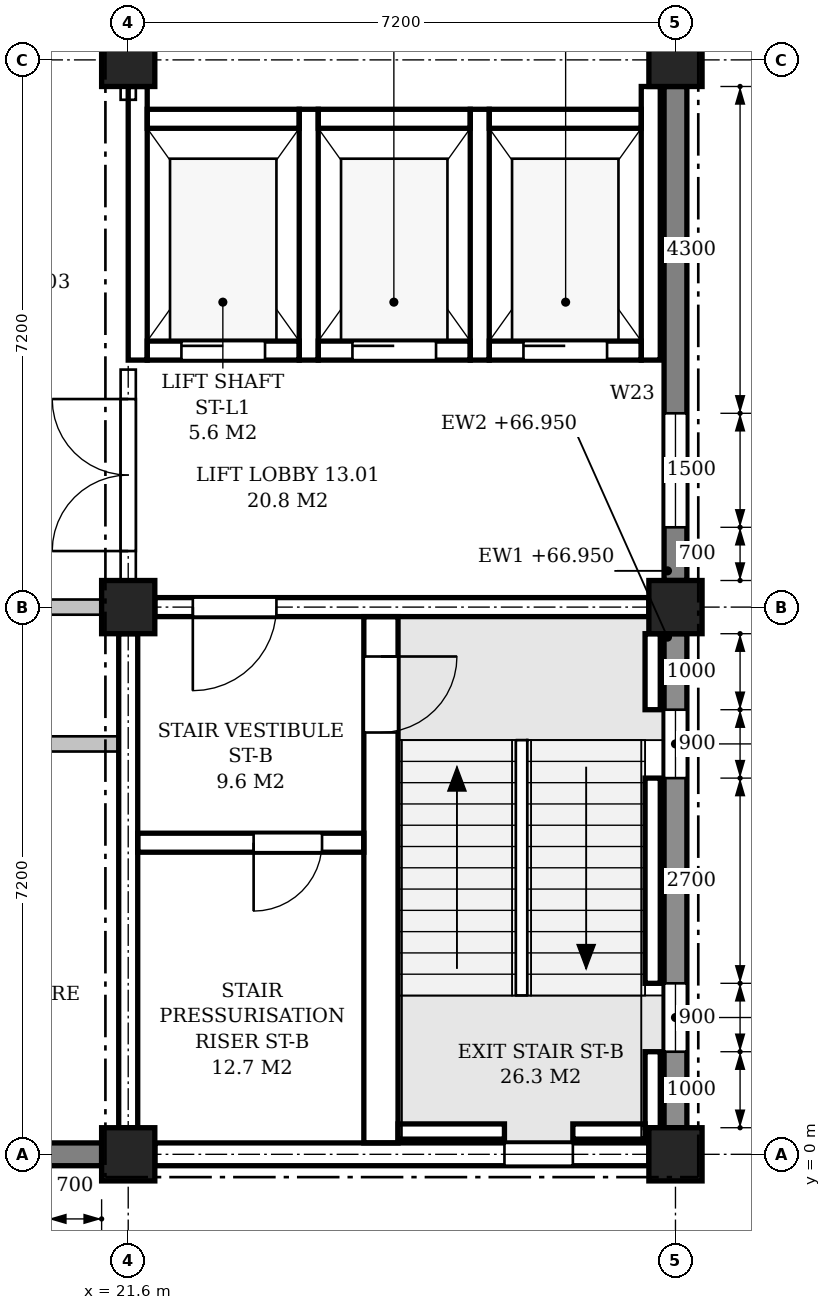
"""IFC4 building model, lengths in metres.
Left out: names, types, materials, properties, quantities, classifications, styles, units other than length and angle.
Written with IfcOpenShell. Run it as: python <this file> out.ifc"""

import sys

from ifc_helpers import new_model, si_unit, direction, frame, frame_2d, origin, origin_2d, place, context, subcontext, project, spatial, polyline, rectangle, outline, extrude, element, fill, save


model = new_model("IFC4")
c1 = context("Model", 3, precision=1e-05, world=origin(), true_north=direction((0.0, 1.0)))
c2 = subcontext(c1, "Body", "Model", "MODEL_VIEW")
j1 = project(units=[si_unit("LENGTHUNIT", "METRE"), si_unit("PLANEANGLEUNIT", "RADIAN")], contexts=[c1])
p1 = place(None, origin())
s1 = spatial("IfcSite", under=j1, at=p1, CompositionType="ELEMENT")
p2 = place(p1, origin())
s2 = spatial("IfcBuilding", under=s1, at=p2, CompositionType="ELEMENT")
p3 = place(p2, frame((0.0, 0.0, 63.3)))
s3 = spatial("IfcBuildingStorey", under=s2, at=p3, CompositionType="ELEMENT", Elevation=63.3)
for number, where, z_axis, x_axis in (
    (1, (21.6, 0.0, 0.0), (0.0, 0.0, 1.0), (1.0, 0.0, 0.0)),
    (2, (21.6, 7.2, 0.0), (0.0, 0.0, 1.0), (1.0, 0.0, 0.0)),
    (3, (21.6, 14.4, 0.0), (0.0, 0.0, 1.0), (1.0, 0.0, 0.0)),
    (4, (28.8, 0.0, 0.0), (0.0, 0.0, 1.0), (1.0, 0.0, 0.0)),
    (5, (28.8, 7.2, 0.0), (0.0, 0.0, 1.0), (1.0, 0.0, 0.0)),
    (6, (28.8, 14.4, 0.0), (0.0, 0.0, 1.0), (1.0, 0.0, 0.0)),
):
    element("IfcColumn", number, at=place(p3, frame(where, z_axis=z_axis, x_axis=x_axis)), inside=s3, PredefinedType="COLUMN", context=c2, shape_type="SweptSolid", body=[
        extrude(rectangle(XDim=0.7, YDim=0.7, at=origin_2d()), origin(), (0.0, 0.0, 1.0), 4.5),
    ])
p4 = place(p3, frame((14.75, 0.0, 0.0), z_axis=(0.0, 0.0, 1.0), x_axis=(1.0, 0.0, 0.0)))
e7 = element("IfcWall", 7, at=p4, inside=s3, PredefinedType="STANDARD", context=c2, shape_type="SweptSolid", body=[
    extrude(rectangle(XDim=6.5, YDim=0.3, at=frame_2d((3.25, 0.0))), origin(), (0.0, 0.0, 1.0), 3.65),
])
p5 = place(p4, frame((0.7, 0.0, 0.9)))
e8 = element("IfcOpeningElement", 8, at=p5, cuts=e7, PredefinedType="OPENING", context=c2, shape_type="SweptSolid", body=[
    extrude(outline(polyline([(0.0, 0.0), (1.5, 0.0), (1.5, 1.95), (0.75, 2.7), (0.0, 1.95), (0.0, 0.0)])), frame((0.0, 0.16, 0.0), z_axis=(0.0, -1.0, 0.0), x_axis=(1.0, 0.0, 0.0)), (0.0, 0.0, 1.0), 0.32),
])
p6 = place(p4, frame((4.3, 0.0, 0.9)))
e9 = element("IfcOpeningElement", 9, at=p6, cuts=e7, PredefinedType="OPENING", context=c2, shape_type="SweptSolid", body=[
    extrude(outline(polyline([(0.0, 0.0), (1.5, 0.0), (1.5, 1.95), (0.75, 2.7), (0.0, 1.95), (0.0, 0.0)])), frame((0.0, 0.16, 0.0), z_axis=(0.0, -1.0, 0.0), x_axis=(1.0, 0.0, 0.0)), (0.0, 0.0, 1.0), 0.32),
])
p7 = place(p3, frame((21.95, 0.0, 0.0), z_axis=(0.0, 0.0, 1.0), x_axis=(1.0, 0.0, 0.0)))
e10 = element("IfcWall", 10, at=p7, inside=s3, PredefinedType="STANDARD", context=c2, shape_type="SweptSolid", body=[
    extrude(rectangle(XDim=6.5, YDim=0.3, at=frame_2d((3.25, 0.0))), origin(), (0.0, 0.0, 1.0), 3.65),
])
p8 = place(p7, frame((4.6, 0.0, 0.9)))
e11 = element("IfcOpeningElement", 11, at=p8, cuts=e10, PredefinedType="OPENING", context=c2, shape_type="SweptSolid", body=[
    extrude(outline(polyline([(0.0, 0.0), (0.9, 0.0), (0.9, 2.25), (0.45, 2.7), (0.0, 2.25), (0.0, 0.0)])), frame((0.0, 0.16, 0.0), z_axis=(0.0, -1.0, 0.0), x_axis=(1.0, 0.0, 0.0)), (0.0, 0.0, 1.0), 0.32),
])
p9 = place(p3, frame((28.8, 0.35, 0.0), z_axis=(0.0, 0.0, 1.0), x_axis=(0.0, 1.0, 0.0)))
e12 = element("IfcWall", 12, at=p9, inside=s3, PredefinedType="STANDARD", context=c2, shape_type="SweptSolid", body=[
    extrude(rectangle(XDim=6.5, YDim=0.3, at=frame_2d((3.25, 0.0))), origin(), (0.0, 0.0, 1.0), 3.65),
])
p10 = place(p9, frame((1.0, 0.0, 0.9)))
e13 = element("IfcOpeningElement", 13, at=p10, cuts=e12, PredefinedType="OPENING", context=c2, shape_type="SweptSolid", body=[
    extrude(outline(polyline([(0.0, 0.0), (0.9, 0.0), (0.9, 2.25), (0.45, 2.7), (0.0, 2.25), (0.0, 0.0)])), frame((0.0, 0.16, 0.0), z_axis=(0.0, -1.0, 0.0), x_axis=(1.0, 0.0, 0.0)), (0.0, 0.0, 1.0), 0.32),
])
p11 = place(p9, frame((4.6, 0.0, 0.9)))
e14 = element("IfcOpeningElement", 14, at=p11, cuts=e12, PredefinedType="OPENING", context=c2, shape_type="SweptSolid", body=[
    extrude(outline(polyline([(0.0, 0.0), (0.9, 0.0), (0.9, 2.25), (0.45, 2.7), (0.0, 2.25), (0.0, 0.0)])), frame((0.0, 0.16, 0.0), z_axis=(0.0, -1.0, 0.0), x_axis=(1.0, 0.0, 0.0)), (0.0, 0.0, 1.0), 0.32),
])
p12 = place(p3, frame((28.8, 7.55, 0.0), z_axis=(0.0, 0.0, 1.0), x_axis=(0.0, 1.0, 0.0)))
e15 = element("IfcWall", 15, at=p12, inside=s3, PredefinedType="STANDARD", context=c2, shape_type="SweptSolid", body=[
    extrude(rectangle(XDim=6.5, YDim=0.3, at=frame_2d((3.25, 0.0))), origin(), (0.0, 0.0, 1.0), 3.65),
])
p13 = place(p12, frame((0.7, 0.0, 0.9)))
e16 = element("IfcOpeningElement", 16, at=p13, cuts=e15, PredefinedType="OPENING", context=c2, shape_type="SweptSolid", body=[
    extrude(outline(polyline([(0.0, 0.0), (1.5, 0.0), (1.5, 1.95), (0.75, 2.7), (0.0, 1.95), (0.0, 0.0)])), frame((0.0, 0.16, 0.0), z_axis=(0.0, -1.0, 0.0), x_axis=(1.0, 0.0, 0.0)), (0.0, 0.0, 1.0), 0.32),
])
p14 = place(p3, frame((21.95, 7.2, 0.0), z_axis=(0.0, 0.0, 1.0), x_axis=(1.0, 0.0, 0.0)))
e17 = element("IfcWall", 17, at=p14, inside=s3, PredefinedType="SHEAR", context=c2, shape_type="SweptSolid", body=[
    extrude(rectangle(XDim=6.5, YDim=0.25, at=frame_2d((3.25, 0.0))), origin(), (0.0, 0.0, 1.0), 3.6),
])
p15 = place(p14, frame((0.5, 0.0, 0.0)))
e18 = element("IfcOpeningElement", 18, at=p15, cuts=e17, PredefinedType="OPENING", context=c2, shape_type="SweptSolid", body=[
    extrude(rectangle(XDim=1.1, YDim=2.1, at=frame_2d((0.55, 1.05))), frame((0.0, 0.135, 0.0), z_axis=(0.0, -1.0, 0.0), x_axis=(1.0, 0.0, 0.0)), (0.0, 0.0, 1.0), 0.27),
])
p16 = place(p3, frame((21.6, 0.35, 0.0), z_axis=(0.0, 0.0, 1.0), x_axis=(0.0, 1.0, 0.0)))
e19 = element("IfcWall", 19, at=p16, inside=s3, PredefinedType="SHEAR", context=c2, shape_type="SweptSolid", body=[
    extrude(rectangle(XDim=6.5, YDim=0.25, at=frame_2d((3.25, 0.0))), origin(), (0.0, 0.0, 1.0), 3.6),
])
p17 = place(p3, frame((28.5, 0.35, -0.25), z_axis=(0.0, 0.0, 1.0), x_axis=(0.0, 1.0, 0.0)))
e20 = element("IfcWall", 20, at=p17, inside=s3, PredefinedType="SHEAR", context=c2, shape_type="SweptSolid", body=[
    extrude(rectangle(XDim=1.0, YDim=0.2, at=frame_2d((0.5, 0.0))), origin(), (0.0, 0.0, 1.0), 4.5),
])
p18 = place(p3, frame((28.5, 2.25, -0.25), z_axis=(0.0, 0.0, 1.0), x_axis=(0.0, 1.0, 0.0)))
e21 = element("IfcWall", 21, at=p18, inside=s3, PredefinedType="SHEAR", context=c2, shape_type="SweptSolid", body=[
    extrude(rectangle(XDim=2.7, YDim=0.2, at=frame_2d((1.35, 0.0))), origin(), (0.0, 0.0, 1.0), 4.5),
])
p19 = place(p3, frame((28.5, 5.85, -0.25), z_axis=(0.0, 0.0, 1.0), x_axis=(0.0, 1.0, 0.0)))
e22 = element("IfcWall", 22, at=p19, inside=s3, PredefinedType="SHEAR", context=c2, shape_type="SweptSolid", body=[
    extrude(rectangle(XDim=1.0, YDim=0.2, at=frame_2d((0.5, 0.0))), origin(), (0.0, 0.0, 1.0), 4.5),
])
p20 = place(p3, frame((25.15, 0.3, -0.25), z_axis=(0.0, 0.0, 1.0), x_axis=(1.0, 0.0, 0.0)))
e23 = element("IfcWall", 23, at=p20, inside=s3, PredefinedType="SHEAR", context=c2, shape_type="SweptSolid", body=[
    extrude(rectangle(XDim=1.4, YDim=0.2, at=frame_2d((0.7, 0.0))), origin(), (0.0, 0.0, 1.0), 4.5),
])
p21 = place(p3, frame((27.45, 0.3, -0.25), z_axis=(0.0, 0.0, 1.0), x_axis=(1.0, 0.0, 0.0)))
e24 = element("IfcWall", 24, at=p21, inside=s3, PredefinedType="SHEAR", context=c2, shape_type="SweptSolid", body=[
    extrude(rectangle(XDim=0.95, YDim=0.2, at=frame_2d((0.475, 0.0))), origin(), (0.0, 0.0, 1.0), 4.5),
])
p22 = place(p3, frame((24.925, 0.15, 0.0), z_axis=(0.0, 0.0, 1.0), x_axis=(0.0, 1.0, 0.0)))
e25 = element("IfcWall", 25, at=p22, inside=s3, PredefinedType="SHEAR", context=c2, shape_type="SweptSolid", body=[
    extrude(rectangle(XDim=6.925, YDim=0.45, at=frame_2d((3.462, 0.0))), origin(), (0.0, 0.0, 1.0), 4.25),
])
p23 = place(p22, frame((5.4, 0.0, 0.0)))
e26 = element("IfcOpeningElement", 26, at=p23, cuts=e25, PredefinedType="OPENING", context=c2, shape_type="SweptSolid", body=[
    extrude(rectangle(XDim=1.0, YDim=2.1, at=frame_2d((0.5, 1.05))), frame((0.0, 0.235, 0.0), z_axis=(0.0, -1.0, 0.0), x_axis=(1.0, 0.0, 0.0)), (0.0, 0.0, 1.0), 0.47),
])
p24 = place(p3, frame((21.725, 4.1, 0.0), z_axis=(0.0, 0.0, 1.0), x_axis=(1.0, 0.0, 0.0)))
e27 = element("IfcWall", 27, at=p24, inside=s3, PredefinedType="SHEAR", context=c2, shape_type="SweptSolid", body=[
    extrude(rectangle(XDim=2.975, YDim=0.25, at=frame_2d((1.487, 0.0))), origin(), (0.0, 0.0, 1.0), 4.25),
])
p25 = place(p24, frame((1.525, 0.0, 0.0)))
e28 = element("IfcOpeningElement", 28, at=p25, cuts=e27, PredefinedType="OPENING", context=c2, shape_type="SweptSolid", body=[
    extrude(rectangle(XDim=0.9, YDim=2.1, at=frame_2d((0.45, 1.05))), frame((0.0, 0.135, 0.0), z_axis=(0.0, -1.0, 0.0), x_axis=(1.0, 0.0, 0.0)), (0.0, 0.0, 1.0), 0.27),
])
p26 = place(p3, frame((21.725, 10.45, -0.25), z_axis=(0.0, 0.0, 1.0), x_axis=(0.0, 1.0, 0.0)))
e29 = element("IfcWall", 29, at=p26, inside=s3, PredefinedType="SHEAR", context=c2, shape_type="SweptSolid", body=[
    extrude(rectangle(XDim=3.6, YDim=0.25, at=frame_2d((1.8, 0.0))), origin(), (0.0, 0.0, 1.0), 3.85),
])
for number, where, z_axis, x_axis in (
    (30, (23.975, 10.45, -0.25), (0.0, 0.0, 1.0), (0.0, 1.0, 0.0)),
    (31, (26.225, 10.45, -0.25), (0.0, 0.0, 1.0), (0.0, 1.0, 0.0)),
):
    element("IfcWall", number, at=place(p3, frame(where, z_axis=z_axis, x_axis=x_axis)), inside=s3, PredefinedType="SHEAR", context=c2, shape_type="SweptSolid", body=[
        extrude(rectangle(XDim=3.3, YDim=0.25, at=frame_2d((1.65, 0.0))), origin(), (0.0, 0.0, 1.0), 4.5),
    ])
p27 = place(p3, frame((28.475, 10.45, -0.25), z_axis=(0.0, 0.0, 1.0), x_axis=(0.0, 1.0, 0.0)))
e32 = element("IfcWall", 32, at=p27, inside=s3, PredefinedType="SHEAR", context=c2, shape_type="SweptSolid", body=[
    extrude(rectangle(XDim=3.6, YDim=0.25, at=frame_2d((1.8, 0.0))), origin(), (0.0, 0.0, 1.0), 4.5),
])
p28 = place(p3, frame((21.85, 10.575, -0.25), z_axis=(0.0, 0.0, 1.0), x_axis=(1.0, 0.0, 0.0)))
e33 = element("IfcWall", 33, at=p28, inside=s3, PredefinedType="SHEAR", context=c2, shape_type="SweptSolid", body=[
    extrude(rectangle(XDim=2.0, YDim=0.25, at=frame_2d((1.0, 0.0))), origin(), (0.0, 0.0, 1.0), 4.5),
])
p29 = place(p28, frame((0.45, 0.0, 0.25)))
e34 = element("IfcOpeningElement", 34, at=p29, cuts=e33, PredefinedType="OPENING", context=c2, shape_type="SweptSolid", body=[
    extrude(rectangle(XDim=1.1, YDim=2.1, at=frame_2d((0.55, 1.05))), frame((0.0, 0.135, 0.0), z_axis=(0.0, -1.0, 0.0), x_axis=(1.0, 0.0, 0.0)), (0.0, 0.0, 1.0), 0.27),
])
p30 = place(p3, frame((21.85, 13.625, -0.25), z_axis=(0.0, 0.0, 1.0), x_axis=(1.0, 0.0, 0.0)))
e35 = element("IfcWall", 35, at=p30, inside=s3, PredefinedType="SHEAR", context=c2, shape_type="SweptSolid", body=[
    extrude(rectangle(XDim=2.0, YDim=0.25, at=frame_2d((1.0, 0.0))), origin(), (0.0, 0.0, 1.0), 4.5),
])
p31 = place(p3, frame((24.1, 10.575, -0.25), z_axis=(0.0, 0.0, 1.0), x_axis=(1.0, 0.0, 0.0)))
e36 = element("IfcWall", 36, at=p31, inside=s3, PredefinedType="SHEAR", context=c2, shape_type="SweptSolid", body=[
    extrude(rectangle(XDim=2.0, YDim=0.25, at=frame_2d((1.0, 0.0))), origin(), (0.0, 0.0, 1.0), 4.5),
])
p32 = place(p31, frame((0.45, 0.0, 0.25)))
e37 = element("IfcOpeningElement", 37, at=p32, cuts=e36, PredefinedType="OPENING", context=c2, shape_type="SweptSolid", body=[
    extrude(rectangle(XDim=1.1, YDim=2.1, at=frame_2d((0.55, 1.05))), frame((0.0, 0.135, 0.0), z_axis=(0.0, -1.0, 0.0), x_axis=(1.0, 0.0, 0.0)), (0.0, 0.0, 1.0), 0.27),
])
p33 = place(p3, frame((24.1, 13.625, -0.25), z_axis=(0.0, 0.0, 1.0), x_axis=(1.0, 0.0, 0.0)))
e38 = element("IfcWall", 38, at=p33, inside=s3, PredefinedType="SHEAR", context=c2, shape_type="SweptSolid", body=[
    extrude(rectangle(XDim=2.0, YDim=0.25, at=frame_2d((1.0, 0.0))), origin(), (0.0, 0.0, 1.0), 4.5),
])
p34 = place(p3, frame((26.35, 10.575, -0.25), z_axis=(0.0, 0.0, 1.0), x_axis=(1.0, 0.0, 0.0)))
e39 = element("IfcWall", 39, at=p34, inside=s3, PredefinedType="SHEAR", context=c2, shape_type="SweptSolid", body=[
    extrude(rectangle(XDim=2.0, YDim=0.25, at=frame_2d((1.0, 0.0))), origin(), (0.0, 0.0, 1.0), 4.5),
])
p35 = place(p34, frame((0.45, 0.0, 0.25)))
e40 = element("IfcOpeningElement", 40, at=p35, cuts=e39, PredefinedType="OPENING", context=c2, shape_type="SweptSolid", body=[
    extrude(rectangle(XDim=1.1, YDim=2.1, at=frame_2d((0.55, 1.05))), frame((0.0, 0.135, 0.0), z_axis=(0.0, -1.0, 0.0), x_axis=(1.0, 0.0, 0.0)), (0.0, 0.0, 1.0), 0.27),
])
p36 = place(p3, frame((26.35, 13.625, -0.25), z_axis=(0.0, 0.0, 1.0), x_axis=(1.0, 0.0, 0.0)))
e41 = element("IfcWall", 41, at=p36, inside=s3, PredefinedType="SHEAR", context=c2, shape_type="SweptSolid", body=[
    extrude(rectangle(XDim=2.0, YDim=0.25, at=frame_2d((1.0, 0.0))), origin(), (0.0, 0.0, 1.0), 4.5),
])
p37 = place(p3, frame((7.325, 5.4, 0.0), z_axis=(0.0, 0.0, 1.0), x_axis=(1.0, 0.0, 0.0)))
e42 = element("IfcWall", 42, at=p37, inside=s3, PredefinedType="PARTITIONING", context=c2, shape_type="SweptSolid", body=[
    extrude(outline(polyline([(0.0, 0.0), (14.15, 0.0), (14.15, 3.6), (14.075, 3.6), (14.075, 4.25), (7.275, 4.25), (7.275, 3.6), (6.875, 3.6), (6.875, 4.25), (0.075, 4.25), (0.075, 3.6), (0.0, 3.6), (0.0, 0.0)])), frame((0.0, 0.1, 0.0), z_axis=(0.0, -1.0, 0.0), x_axis=(1.0, 0.0, 0.0)), (0.0, 0.0, 1.0), 0.2),
])
p38 = place(p37, frame((1.238, 0.0, 0.0)))
e43 = element("IfcOpeningElement", 43, at=p38, cuts=e42, PredefinedType="OPENING", context=c2, shape_type="SweptSolid", body=[
    extrude(rectangle(XDim=1.0, YDim=2.1, at=frame_2d((0.5, 1.05))), frame((0.0, 0.11, 0.0), z_axis=(0.0, -1.0, 0.0), x_axis=(1.0, 0.0, 0.0)), (0.0, 0.0, 1.0), 0.22),
])
p39 = place(p37, frame((4.775, 0.0, 0.0)))
e44 = element("IfcOpeningElement", 44, at=p39, cuts=e42, PredefinedType="OPENING", context=c2, shape_type="SweptSolid", body=[
    extrude(rectangle(XDim=1.0, YDim=2.1, at=frame_2d((0.5, 1.05))), frame((0.0, 0.11, 0.0), z_axis=(0.0, -1.0, 0.0), x_axis=(1.0, 0.0, 0.0)), (0.0, 0.0, 1.0), 0.22),
])
p40 = place(p37, frame((8.375, 0.0, 0.0)))
e45 = element("IfcOpeningElement", 45, at=p40, cuts=e42, PredefinedType="OPENING", context=c2, shape_type="SweptSolid", body=[
    extrude(rectangle(XDim=1.0, YDim=2.1, at=frame_2d((0.5, 1.05))), frame((0.0, 0.11, 0.0), z_axis=(0.0, -1.0, 0.0), x_axis=(1.0, 0.0, 0.0)), (0.0, 0.0, 1.0), 0.22),
])
p41 = place(p37, frame((11.913, 0.0, 0.0)))
e46 = element("IfcOpeningElement", 46, at=p41, cuts=e42, PredefinedType="OPENING", context=c2, shape_type="SweptSolid", body=[
    extrude(rectangle(XDim=1.0, YDim=2.1, at=frame_2d((0.5, 1.05))), frame((0.0, 0.11, 0.0), z_axis=(0.0, -1.0, 0.0), x_axis=(1.0, 0.0, 0.0)), (0.0, 0.0, 1.0), 0.22),
])
p42 = place(p3, frame((14.75, 7.2, 0.0), z_axis=(0.0, 0.0, 1.0), x_axis=(1.0, 0.0, 0.0)))
e47 = element("IfcWall", 47, at=p42, inside=s3, PredefinedType="PARTITIONING", context=c2, shape_type="SweptSolid", body=[
    extrude(rectangle(XDim=6.5, YDim=0.2, at=frame_2d((3.25, 0.0))), origin(), (0.0, 0.0, 1.0), 3.6),
])
p43 = place(p42, frame((4.375, 0.0, 0.0)))
e48 = element("IfcOpeningElement", 48, at=p43, cuts=e47, PredefinedType="OPENING", context=c2, shape_type="SweptSolid", body=[
    extrude(rectangle(XDim=1.0, YDim=2.1, at=frame_2d((0.5, 1.05))), frame((0.0, 0.11, 0.0), z_axis=(0.0, -1.0, 0.0), x_axis=(1.0, 0.0, 0.0)), (0.0, 0.0, 1.0), 0.22),
])
p44 = place(p3, frame((21.6, 7.55, 0.0), z_axis=(0.0, 0.0, 1.0), x_axis=(0.0, 1.0, 0.0)))
e49 = element("IfcWall", 49, at=p44, inside=s3, PredefinedType="PARTITIONING", context=c2, shape_type="SweptSolid", body=[
    extrude(rectangle(XDim=2.775, YDim=0.2, at=frame_2d((1.387, 0.0))), origin(), (0.0, 0.0, 1.0), 3.6),
])
p45 = place(p44, frame((0.387, 0.0, 0.0)))
e50 = element("IfcOpeningElement", 50, at=p45, cuts=e49, PredefinedType="OPENING", context=c2, shape_type="SweptSolid", body=[
    extrude(rectangle(XDim=2.0, YDim=2.4, at=frame_2d((1.0, 1.2))), frame((0.0, 0.11, 0.0), z_axis=(0.0, -1.0, 0.0), x_axis=(1.0, 0.0, 0.0)), (0.0, 0.0, 1.0), 0.22),
])
p46 = place(p3, frame((21.6, 13.875, 0.0), z_axis=(0.0, 0.0, 1.0), x_axis=(0.0, 1.0, 0.0)))
e51 = element("IfcWall", 51, at=p46, inside=s3, PredefinedType="PARTITIONING", context=c2, shape_type="SweptSolid", body=[
    extrude(rectangle(XDim=0.175, YDim=0.2, at=frame_2d((0.087, 0.0))), origin(), (0.0, 0.0, 1.0), 3.6),
])
p47 = place(p10, origin())
e52 = element("IfcWindow", 52, at=p47, inside=s3, PartitioningType="SINGLE_PANEL", PredefinedType="WINDOW", context=c2, shape_type="SweptSolid", body=[
    extrude(outline(polyline([(0.0, 0.0), (0.9, 0.0), (0.9, 2.25), (0.45, 2.7), (0.0, 2.25), (0.0, 0.0)])), frame((0.0, 0.03, 0.0), z_axis=(0.0, -1.0, 0.0), x_axis=(1.0, 0.0, 0.0)), (0.0, 0.0, 1.0), 0.06),
])
fill(e13, e52)
p48 = place(p11, origin())
e53 = element("IfcWindow", 53, at=p48, inside=s3, PartitioningType="SINGLE_PANEL", PredefinedType="WINDOW", context=c2, shape_type="SweptSolid", body=[
    extrude(outline(polyline([(0.0, 0.0), (0.9, 0.0), (0.9, 2.25), (0.45, 2.7), (0.0, 2.25), (0.0, 0.0)])), frame((0.0, 0.03, 0.0), z_axis=(0.0, -1.0, 0.0), x_axis=(1.0, 0.0, 0.0)), (0.0, 0.0, 1.0), 0.06),
])
fill(e14, e53)
p49 = place(p13, origin())
e54 = element("IfcWindow", 54, at=p49, inside=s3, PartitioningType="SINGLE_PANEL", PredefinedType="WINDOW", context=c2, shape_type="SweptSolid", body=[
    extrude(outline(polyline([(0.0, 0.0), (1.5, 0.0), (1.5, 1.95), (0.75, 2.7), (0.0, 1.95), (0.0, 0.0)])), frame((0.0, 0.03, 0.0), z_axis=(0.0, -1.0, 0.0), x_axis=(1.0, 0.0, 0.0)), (0.0, 0.0, 1.0), 0.06),
])
fill(e16, e54)
p50 = place(p8, origin())
e55 = element("IfcWindow", 55, at=p50, inside=s3, PartitioningType="SINGLE_PANEL", PredefinedType="WINDOW", context=c2, shape_type="SweptSolid", body=[
    extrude(outline(polyline([(0.0, 0.0), (0.9, 0.0), (0.9, 2.25), (0.45, 2.7), (0.0, 2.25), (0.0, 0.0)])), frame((0.0, 0.03, 0.0), z_axis=(0.0, -1.0, 0.0), x_axis=(1.0, 0.0, 0.0)), (0.0, 0.0, 1.0), 0.06),
])
fill(e11, e55)
p51 = place(p23, frame((1.0, 0.0, 0.0), z_axis=(0.0, 0.0, 1.0), x_axis=(-1.0, 0.0, 0.0)))
e56 = element("IfcDoor", 56, at=p51, inside=s3, OperationType="SINGLE_SWING_LEFT", PredefinedType="DOOR", context=c2, shape_type="SweptSolid", body=[
    extrude(rectangle(XDim=1.0, YDim=2.1, at=frame_2d((0.5, 1.05))), frame((0.0, 0.025, 0.0), z_axis=(0.0, -1.0, 0.0), x_axis=(1.0, 0.0, 0.0)), (0.0, 0.0, 1.0), 0.05),
])
fill(e26, e56)
p52 = place(p15, frame((1.1, 0.0, 0.0), z_axis=(0.0, 0.0, 1.0), x_axis=(-1.0, 0.0, 0.0)))
e57 = element("IfcDoor", 57, at=p52, inside=s3, OperationType="SINGLE_SWING_RIGHT", PredefinedType="DOOR", context=c2, shape_type="SweptSolid", body=[
    extrude(rectangle(XDim=1.1, YDim=2.1, at=frame_2d((0.55, 1.05))), frame((0.0, 0.025, 0.0), z_axis=(0.0, -1.0, 0.0), x_axis=(1.0, 0.0, 0.0)), (0.0, 0.0, 1.0), 0.05),
])
fill(e18, e57)
p53 = place(p25, frame((0.9, 0.0, 0.0), z_axis=(0.0, 0.0, 1.0), x_axis=(-1.0, 0.0, 0.0)))
e58 = element("IfcDoor", 58, at=p53, inside=s3, OperationType="SINGLE_SWING_RIGHT", PredefinedType="DOOR", context=c2, shape_type="SweptSolid", body=[
    extrude(rectangle(XDim=0.9, YDim=2.1, at=frame_2d((0.45, 1.05))), frame((0.0, 0.025, 0.0), z_axis=(0.0, -1.0, 0.0), x_axis=(1.0, 0.0, 0.0)), (0.0, 0.0, 1.0), 0.05),
])
fill(e28, e58)
p54 = place(p29, origin())
e59 = element("IfcDoor", 59, at=p54, inside=s3, OperationType="SLIDING_TO_LEFT", PredefinedType="DOOR", context=c2, shape_type="SweptSolid", body=[
    extrude(rectangle(XDim=1.1, YDim=2.1, at=frame_2d((0.55, 1.05))), frame((0.0, 0.025, 0.0), z_axis=(0.0, -1.0, 0.0), x_axis=(1.0, 0.0, 0.0)), (0.0, 0.0, 1.0), 0.05),
])
fill(e34, e59)
p55 = place(p32, origin())
e60 = element("IfcDoor", 60, at=p55, inside=s3, OperationType="SLIDING_TO_LEFT", PredefinedType="DOOR", context=c2, shape_type="SweptSolid", body=[
    extrude(rectangle(XDim=1.1, YDim=2.1, at=frame_2d((0.55, 1.05))), frame((0.0, 0.025, 0.0), z_axis=(0.0, -1.0, 0.0), x_axis=(1.0, 0.0, 0.0)), (0.0, 0.0, 1.0), 0.05),
])
fill(e37, e60)
p56 = place(p35, origin())
e61 = element("IfcDoor", 61, at=p56, inside=s3, OperationType="SLIDING_TO_LEFT", PredefinedType="DOOR", context=c2, shape_type="SweptSolid", body=[
    extrude(rectangle(XDim=1.1, YDim=2.1, at=frame_2d((0.55, 1.05))), frame((0.0, 0.025, 0.0), z_axis=(0.0, -1.0, 0.0), x_axis=(1.0, 0.0, 0.0)), (0.0, 0.0, 1.0), 0.05),
])
fill(e40, e61)
p57 = place(p45, origin())
e62 = element("IfcDoor", 62, at=p57, inside=s3, OperationType="DOUBLE_DOOR_SINGLE_SWING", PredefinedType="DOOR", context=c2, shape_type="SweptSolid", body=[
    extrude(rectangle(XDim=2.0, YDim=2.4, at=frame_2d((1.0, 1.2))), frame((0.0, 0.025, 0.0), z_axis=(0.0, -1.0, 0.0), x_axis=(1.0, 0.0, 0.0)), (0.0, 0.0, 1.0), 0.05),
])
fill(e50, e62)
save(model, sys.argv[1])
